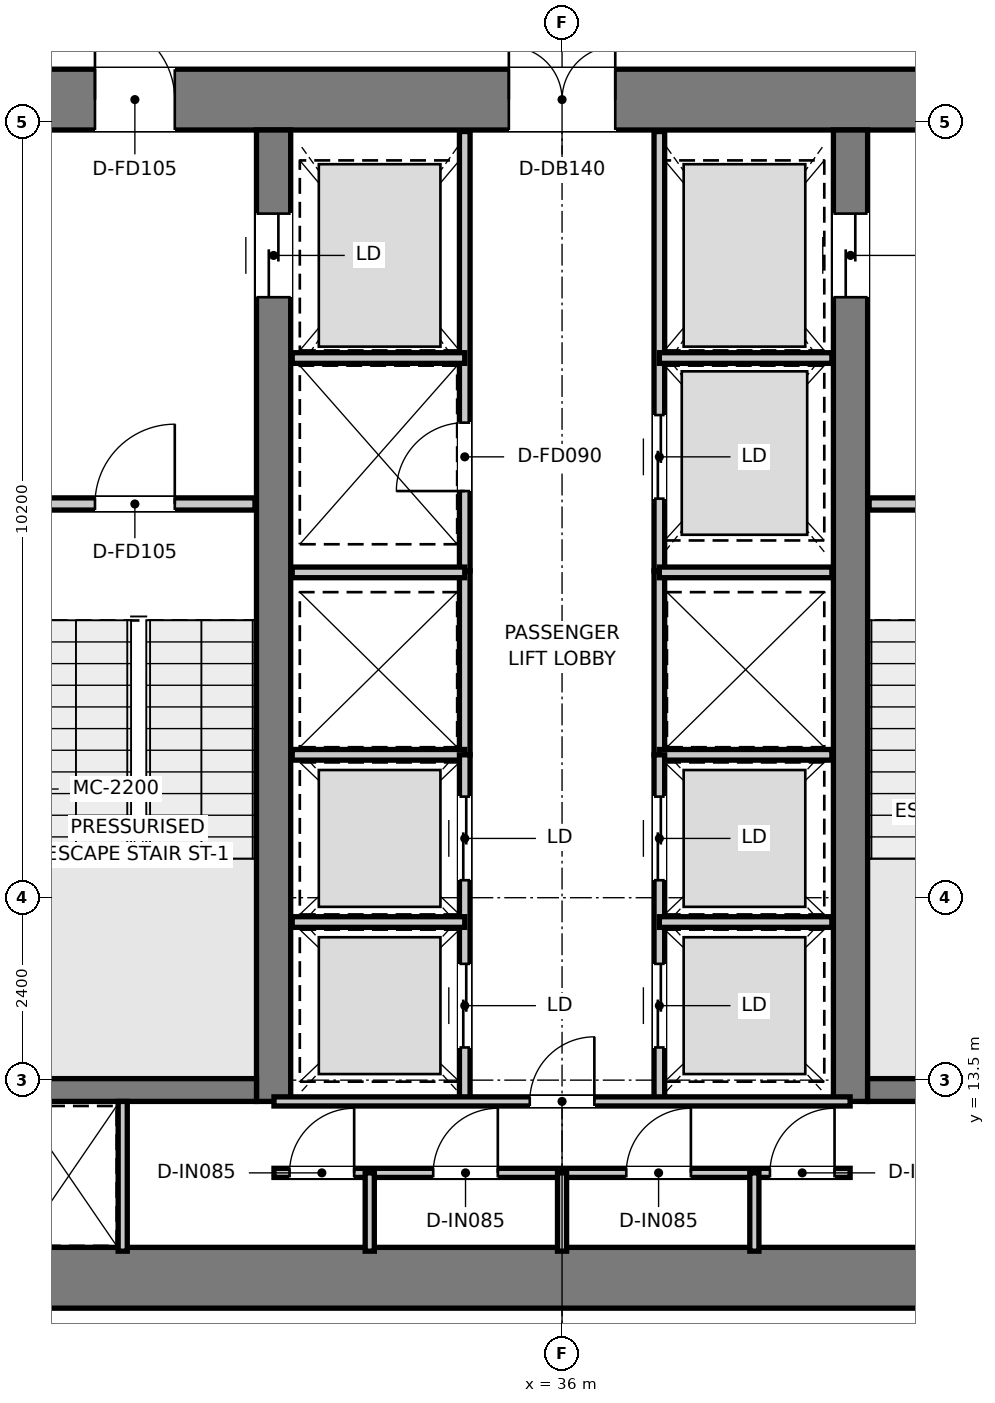
"""IFC4 building model, lengths in metres.
Left out: names, types, materials, properties, quantities, classifications, styles, units other than length and angle.
Written with IfcOpenShell. Run it as: python <this file> out.ifc"""

import sys

from ifc_helpers import new_model, si_unit, direction, frame, frame_2d, origin, place, context, subcontext, project, spatial, rectangle, extrude, element, fill, save


model = new_model("IFC4")
c1 = context("Model", 3, precision=1e-05, world=origin(), true_north=direction((0.0, 1.0)))
c2 = subcontext(c1, "Body", "Model", "MODEL_VIEW")
j1 = project(units=[si_unit("LENGTHUNIT", "METRE"), si_unit("PLANEANGLEUNIT", "RADIAN")], contexts=[c1])
p1 = place(None, origin())
s1 = spatial("IfcSite", under=j1, at=p1, CompositionType="ELEMENT")
p2 = place(p1, origin())
s2 = spatial("IfcBuilding", under=s1, at=p2, CompositionType="ELEMENT")
p3 = place(p2, frame((0.0, 0.0, 56.6)))
s3 = spatial("IfcBuildingStorey", under=s2, at=p3, CompositionType="ELEMENT", Elevation=56.6)
p4 = place(p3, frame((28.08, 10.9, 0.0), z_axis=(0.0, 0.0, 1.0), x_axis=(1.0, 0.0, 0.0)))
e1 = element("IfcWall", 1, at=p4, inside=s3, PredefinedType="SHEAR", context=c2, shape_type="SweptSolid", body=[
    extrude(rectangle(XDim=15.84, YDim=0.8, at=frame_2d((7.92, 0.0))), origin(), (0.0, 0.0, 1.0), 3.95),
])
p5 = place(p3, frame((28.08, 26.4, 0.0), z_axis=(0.0, 0.0, 1.0), x_axis=(1.0, 0.0, 0.0)))
e2 = element("IfcWall", 2, at=p5, inside=s3, PredefinedType="SHEAR", context=c2, shape_type="SweptSolid", body=[
    extrude(rectangle(XDim=15.84, YDim=0.8, at=frame_2d((7.92, 0.0))), origin(), (0.0, 0.0, 1.0), 3.95),
])
p6 = place(p5, frame((7.22, 0.0, 0.0)))
e3 = element("IfcOpeningElement", 3, at=p6, cuts=e2, PredefinedType="OPENING", context=c2, shape_type="SweptSolid", body=[
    extrude(rectangle(XDim=1.4, YDim=2.2, at=frame_2d((0.7, 1.1))), frame((0.0, 0.41, 0.0), z_axis=(0.0, -1.0, 0.0), x_axis=(1.0, 0.0, 0.0)), (0.0, 0.0, 1.0), 0.82),
])
p7 = place(p5, frame((1.775, 0.0, 0.0)))
e4 = element("IfcOpeningElement", 4, at=p7, cuts=e2, PredefinedType="OPENING", context=c2, shape_type="SweptSolid", body=[
    extrude(rectangle(XDim=1.05, YDim=2.1, at=frame_2d((0.525, 1.05))), frame((0.0, 0.41, 0.0), z_axis=(0.0, -1.0, 0.0), x_axis=(1.0, 0.0, 0.0)), (0.0, 0.0, 1.0), 0.82),
])
p8 = place(p5, frame((13.015, 0.0, 0.0)))
e5 = element("IfcOpeningElement", 5, at=p8, cuts=e2, PredefinedType="OPENING", context=c2, shape_type="SweptSolid", body=[
    extrude(rectangle(XDim=1.05, YDim=2.1, at=frame_2d((0.525, 1.05))), frame((0.0, 0.41, 0.0), z_axis=(0.0, -1.0, 0.0), x_axis=(1.0, 0.0, 0.0)), (0.0, 0.0, 1.0), 0.82),
])
p9 = place(p3, frame((32.205, 13.22, 0.0), z_axis=(0.0, 0.0, 1.0), x_axis=(0.0, 1.0, 0.0)))
e6 = element("IfcWall", 6, at=p9, inside=s3, PredefinedType="SHEAR", context=c2, shape_type="SweptSolid", body=[
    extrude(rectangle(XDim=12.78, YDim=0.45, at=frame_2d((6.39, 0.0))), origin(), (0.0, 0.0, 1.0), 3.95),
])
p10 = place(p9, frame((10.58, 0.0, 0.0)))
e7 = element("IfcOpeningElement", 7, at=p10, cuts=e6, PredefinedType="OPENING", context=c2, shape_type="SweptSolid", body=[
    extrude(rectangle(XDim=1.1, YDim=2.15, at=frame_2d((0.55, 1.075))), frame((0.0, 0.235, 0.0), z_axis=(0.0, -1.0, 0.0), x_axis=(1.0, 0.0, 0.0)), (0.0, 0.0, 1.0), 0.47),
])
p11 = place(p3, frame((39.795, 13.22, 0.0), z_axis=(0.0, 0.0, 1.0), x_axis=(0.0, 1.0, 0.0)))
e8 = element("IfcWall", 8, at=p11, inside=s3, PredefinedType="SHEAR", context=c2, shape_type="SweptSolid", body=[
    extrude(rectangle(XDim=12.78, YDim=0.45, at=frame_2d((6.39, 0.0))), origin(), (0.0, 0.0, 1.0), 3.95),
])
p12 = place(p11, frame((10.58, 0.0, 0.0)))
e9 = element("IfcOpeningElement", 9, at=p12, cuts=e8, PredefinedType="OPENING", context=c2, shape_type="SweptSolid", body=[
    extrude(rectangle(XDim=1.1, YDim=2.15, at=frame_2d((0.55, 1.075))), frame((0.0, 0.235, 0.0), z_axis=(0.0, -1.0, 0.0), x_axis=(1.0, 0.0, 0.0)), (0.0, 0.0, 1.0), 0.47),
])
for number, where, z_axis, x_axis in (
    (10, (28.88, 13.37, 0.0), (0.0, 0.0, 1.0), (1.0, 0.0, 0.0)),
    (11, (40.02, 13.37, 0.0), (0.0, 0.0, 1.0), (1.0, 0.0, 0.0)),
):
    element("IfcWall", number, at=place(p3, frame(where, z_axis=z_axis, x_axis=x_axis)), inside=s3, PredefinedType="SHEAR", context=c2, shape_type="SweptSolid", body=[
        extrude(rectangle(XDim=3.1, YDim=0.3, at=frame_2d((1.55, 0.0))), origin(), (0.0, 0.0, 1.0), 3.95),
    ])
p13 = place(p3, frame((28.8, 21.08, 0.0), z_axis=(0.0, 0.0, 1.0), x_axis=(1.0, 0.0, 0.0)))
e12 = element("IfcWall", 12, at=p13, inside=s3, PredefinedType="PARTITIONING", context=c2, shape_type="SweptSolid", body=[
    extrude(rectangle(XDim=3.16, YDim=0.16, at=frame_2d((1.58, 0.0))), origin(), (0.0, 0.0, 1.0), 3.67),
])
p14 = place(p13, frame((1.055, 0.0, 0.0)))
e13 = element("IfcOpeningElement", 13, at=p14, cuts=e12, PredefinedType="OPENING", context=c2, shape_type="SweptSolid", body=[
    extrude(rectangle(XDim=1.05, YDim=2.1, at=frame_2d((0.525, 1.05))), frame((0.0, 0.09, 0.0), z_axis=(0.0, -1.0, 0.0), x_axis=(1.0, 0.0, 0.0)), (0.0, 0.0, 1.0), 0.18),
])
p15 = place(p3, frame((40.04, 21.08, 0.0), z_axis=(0.0, 0.0, 1.0), x_axis=(1.0, 0.0, 0.0)))
e14 = element("IfcWall", 14, at=p15, inside=s3, PredefinedType="PARTITIONING", context=c2, shape_type="SweptSolid", body=[
    extrude(rectangle(XDim=3.16, YDim=0.16, at=frame_2d((1.58, 0.0))), origin(), (0.0, 0.0, 1.0), 3.67),
])
p16 = place(p15, frame((1.055, 0.0, 0.0)))
e15 = element("IfcOpeningElement", 15, at=p16, cuts=e14, PredefinedType="OPENING", context=c2, shape_type="SweptSolid", body=[
    extrude(rectangle(XDim=1.05, YDim=2.1, at=frame_2d((0.525, 1.05))), frame((0.0, 0.09, 0.0), z_axis=(0.0, -1.0, 0.0), x_axis=(1.0, 0.0, 0.0)), (0.0, 0.0, 1.0), 0.18),
])
p17 = place(p3, frame((34.72, 20.2, 0.0), z_axis=(0.0, 0.0, 1.0), x_axis=(0.0, 1.0, 0.0)))
e16 = element("IfcWall", 16, at=p17, inside=s3, PredefinedType="PARTITIONING", context=c2, shape_type="SweptSolid", body=[
    extrude(rectangle(XDim=5.78, YDim=0.14, at=frame_2d((2.89, 0.0))), origin(), (0.0, 0.0, 1.0), 2.47),
])
p18 = place(p17, frame((1.05, 0.0, 0.0)))
e17 = element("IfcOpeningElement", 17, at=p18, cuts=e16, PredefinedType="OPENING", context=c2, shape_type="SweptSolid", body=[
    extrude(rectangle(XDim=0.9, YDim=2.1, at=frame_2d((0.45, 1.05))), frame((0.0, 0.08, 0.0), z_axis=(0.0, -1.0, 0.0), x_axis=(1.0, 0.0, 0.0)), (0.0, 0.0, 1.0), 0.16),
])
p19 = place(p3, frame((37.28, 20.2, 0.0), z_axis=(0.0, 0.0, 1.0), x_axis=(0.0, 1.0, 0.0)))
e18 = element("IfcWall", 18, at=p19, inside=s3, PredefinedType="PARTITIONING", context=c2, shape_type="SweptSolid", body=[
    extrude(rectangle(XDim=5.78, YDim=0.14, at=frame_2d((2.89, 0.0))), origin(), (0.0, 0.0, 1.0), 2.47),
])
p20 = place(p19, frame((0.95, 0.0, 0.0)))
e19 = element("IfcOpeningElement", 19, at=p20, cuts=e18, PredefinedType="OPENING", context=c2, shape_type="SweptSolid", body=[
    extrude(rectangle(XDim=1.1, YDim=2.15, at=frame_2d((0.55, 1.075))), frame((0.0, 0.08, 0.0), z_axis=(0.0, -1.0, 0.0), x_axis=(1.0, 0.0, 0.0)), (0.0, 0.0, 1.0), 0.16),
])
for number, where, z_axis, x_axis in (
    (20, (32.45, 23.0, 0.0), (0.0, 0.0, 1.0), (1.0, 0.0, 0.0)),
    (21, (37.28, 23.0, 0.0), (0.0, 0.0, 1.0), (1.0, 0.0, 0.0)),
):
    element("IfcWall", number, at=place(p3, frame(where, z_axis=z_axis, x_axis=x_axis)), inside=s3, PredefinedType="PARTITIONING", context=c2, shape_type="SweptSolid", body=[
        extrude(rectangle(XDim=2.27, YDim=0.14, at=frame_2d((1.135, 0.0))), origin(), (0.0, 0.0, 1.0), 2.47),
    ])
for number, where, z_axis, x_axis in (
    (22, (34.72, 17.78, 0.0), (0.0, 0.0, 1.0), (0.0, 1.0, 0.0)),
    (23, (37.28, 17.78, 0.0), (0.0, 0.0, 1.0), (0.0, 1.0, 0.0)),
):
    element("IfcWall", number, at=place(p3, frame(where, z_axis=z_axis, x_axis=x_axis)), inside=s3, PredefinedType="PARTITIONING", context=c2, shape_type="SweptSolid", body=[
        extrude(rectangle(XDim=2.42, YDim=0.14, at=frame_2d((1.21, 0.0))), origin(), (0.0, 0.0, 1.0), 3.67),
    ])
for number, where, z_axis, x_axis in (
    (24, (32.45, 17.78, 0.0), (0.0, 0.0, 1.0), (1.0, 0.0, 0.0)),
    (25, (32.45, 20.18, 0.0), (0.0, 0.0, 1.0), (1.0, 0.0, 0.0)),
    (26, (37.28, 17.78, 0.0), (0.0, 0.0, 1.0), (1.0, 0.0, 0.0)),
    (27, (37.28, 20.18, 0.0), (0.0, 0.0, 1.0), (1.0, 0.0, 0.0)),
):
    element("IfcWall", number, at=place(p3, frame(where, z_axis=z_axis, x_axis=x_axis)), inside=s3, PredefinedType="PARTITIONING", context=c2, shape_type="SweptSolid", body=[
        extrude(rectangle(XDim=2.27, YDim=0.14, at=frame_2d((1.135, 0.0))), origin(), (0.0, 0.0, 1.0), 3.67),
    ])
p21 = place(p3, frame((34.72, 13.22, 0.0), z_axis=(0.0, 0.0, 1.0), x_axis=(0.0, 1.0, 0.0)))
e28 = element("IfcWall", 28, at=p21, inside=s3, PredefinedType="PARTITIONING", context=c2, shape_type="SweptSolid", body=[
    extrude(rectangle(XDim=4.56, YDim=0.14, at=frame_2d((2.28, 0.0))), origin(), (0.0, 0.0, 1.0), 3.67),
])
p22 = place(p21, frame((0.71, 0.0, 0.0)))
e29 = element("IfcOpeningElement", 29, at=p22, cuts=e28, PredefinedType="OPENING", context=c2, shape_type="SweptSolid", body=[
    extrude(rectangle(XDim=1.1, YDim=2.15, at=frame_2d((0.55, 1.075))), frame((0.0, 0.08, 0.0), z_axis=(0.0, -1.0, 0.0), x_axis=(1.0, 0.0, 0.0)), (0.0, 0.0, 1.0), 0.16),
])
p23 = place(p21, frame((2.91, 0.0, 0.0)))
e30 = element("IfcOpeningElement", 30, at=p23, cuts=e28, PredefinedType="OPENING", context=c2, shape_type="SweptSolid", body=[
    extrude(rectangle(XDim=1.1, YDim=2.15, at=frame_2d((0.55, 1.075))), frame((0.0, 0.08, 0.0), z_axis=(0.0, -1.0, 0.0), x_axis=(1.0, 0.0, 0.0)), (0.0, 0.0, 1.0), 0.16),
])
p24 = place(p3, frame((32.45, 15.58, 0.0), z_axis=(0.0, 0.0, 1.0), x_axis=(1.0, 0.0, 0.0)))
e31 = element("IfcWall", 31, at=p24, inside=s3, PredefinedType="PARTITIONING", context=c2, shape_type="SweptSolid", body=[
    extrude(rectangle(XDim=2.27, YDim=0.14, at=frame_2d((1.135, 0.0))), origin(), (0.0, 0.0, 1.0), 3.67),
])
p25 = place(p3, frame((37.28, 13.22, 0.0), z_axis=(0.0, 0.0, 1.0), x_axis=(0.0, 1.0, 0.0)))
e32 = element("IfcWall", 32, at=p25, inside=s3, PredefinedType="PARTITIONING", context=c2, shape_type="SweptSolid", body=[
    extrude(rectangle(XDim=4.56, YDim=0.14, at=frame_2d((2.28, 0.0))), origin(), (0.0, 0.0, 1.0), 3.67),
])
p26 = place(p25, frame((0.71, 0.0, 0.0)))
e33 = element("IfcOpeningElement", 33, at=p26, cuts=e32, PredefinedType="OPENING", context=c2, shape_type="SweptSolid", body=[
    extrude(rectangle(XDim=1.1, YDim=2.15, at=frame_2d((0.55, 1.075))), frame((0.0, 0.08, 0.0), z_axis=(0.0, -1.0, 0.0), x_axis=(1.0, 0.0, 0.0)), (0.0, 0.0, 1.0), 0.16),
])
p27 = place(p25, frame((2.91, 0.0, 0.0)))
e34 = element("IfcOpeningElement", 34, at=p27, cuts=e32, PredefinedType="OPENING", context=c2, shape_type="SweptSolid", body=[
    extrude(rectangle(XDim=1.1, YDim=2.15, at=frame_2d((0.55, 1.075))), frame((0.0, 0.08, 0.0), z_axis=(0.0, -1.0, 0.0), x_axis=(1.0, 0.0, 0.0)), (0.0, 0.0, 1.0), 0.16),
])
p28 = place(p3, frame((37.28, 15.58, 0.0), z_axis=(0.0, 0.0, 1.0), x_axis=(1.0, 0.0, 0.0)))
e35 = element("IfcWall", 35, at=p28, inside=s3, PredefinedType="PARTITIONING", context=c2, shape_type="SweptSolid", body=[
    extrude(rectangle(XDim=2.27, YDim=0.14, at=frame_2d((1.135, 0.0))), origin(), (0.0, 0.0, 1.0), 3.67),
])
p29 = place(p3, frame((30.22, 11.25, 0.0), z_axis=(0.0, 0.0, 1.0), x_axis=(0.0, 1.0, 0.0)))
e36 = element("IfcWall", 36, at=p29, inside=s3, PredefinedType="PARTITIONING", context=c2, shape_type="SweptSolid", body=[
    extrude(rectangle(XDim=1.97, YDim=0.12, at=frame_2d((0.985, 0.0))), origin(), (0.0, 0.0, 1.0), 3.67),
])
p30 = place(p3, frame((32.21, 13.22, 0.0), z_axis=(0.0, 0.0, 1.0), x_axis=(1.0, 0.0, 0.0)))
e37 = element("IfcWall", 37, at=p30, inside=s3, PredefinedType="PARTITIONING", context=c2, shape_type="SweptSolid", body=[
    extrude(rectangle(XDim=7.58, YDim=0.12, at=frame_2d((3.79, 0.0))), origin(), (0.0, 0.0, 1.0), 3.67),
])
p31 = place(p30, frame((3.365, 0.0, 0.0)))
e38 = element("IfcOpeningElement", 38, at=p31, cuts=e37, PredefinedType="OPENING", context=c2, shape_type="SweptSolid", body=[
    extrude(rectangle(XDim=0.85, YDim=2.1, at=frame_2d((0.425, 1.05))), frame((0.0, 0.07, 0.0), z_axis=(0.0, -1.0, 0.0), x_axis=(1.0, 0.0, 0.0)), (0.0, 0.0, 1.0), 0.14),
])
p32 = place(p3, frame((32.21, 12.28, 0.0), z_axis=(0.0, 0.0, 1.0), x_axis=(1.0, 0.0, 0.0)))
e39 = element("IfcWall", 39, at=p32, inside=s3, PredefinedType="PARTITIONING", context=c2, shape_type="SweptSolid", body=[
    extrude(rectangle(XDim=7.58, YDim=0.12, at=frame_2d((3.79, 0.0))), origin(), (0.0, 0.0, 1.0), 3.67),
])
p33 = place(p32, frame((0.205, 0.0, 0.0)))
e40 = element("IfcOpeningElement", 40, at=p33, cuts=e39, PredefinedType="OPENING", context=c2, shape_type="SweptSolid", body=[
    extrude(rectangle(XDim=0.85, YDim=2.1, at=frame_2d((0.425, 1.05))), frame((0.0, 0.07, 0.0), z_axis=(0.0, -1.0, 0.0), x_axis=(1.0, 0.0, 0.0)), (0.0, 0.0, 1.0), 0.14),
])
p34 = place(p32, frame((2.095, 0.0, 0.0)))
e41 = element("IfcOpeningElement", 41, at=p34, cuts=e39, PredefinedType="OPENING", context=c2, shape_type="SweptSolid", body=[
    extrude(rectangle(XDim=0.85, YDim=2.1, at=frame_2d((0.425, 1.05))), frame((0.0, 0.07, 0.0), z_axis=(0.0, -1.0, 0.0), x_axis=(1.0, 0.0, 0.0)), (0.0, 0.0, 1.0), 0.14),
])
p35 = place(p32, frame((4.635, 0.0, 0.0)))
e42 = element("IfcOpeningElement", 42, at=p35, cuts=e39, PredefinedType="OPENING", context=c2, shape_type="SweptSolid", body=[
    extrude(rectangle(XDim=0.85, YDim=2.1, at=frame_2d((0.425, 1.05))), frame((0.0, 0.07, 0.0), z_axis=(0.0, -1.0, 0.0), x_axis=(1.0, 0.0, 0.0)), (0.0, 0.0, 1.0), 0.14),
])
p36 = place(p32, frame((6.525, 0.0, 0.0)))
e43 = element("IfcOpeningElement", 43, at=p36, cuts=e39, PredefinedType="OPENING", context=c2, shape_type="SweptSolid", body=[
    extrude(rectangle(XDim=0.85, YDim=2.1, at=frame_2d((0.425, 1.05))), frame((0.0, 0.07, 0.0), z_axis=(0.0, -1.0, 0.0), x_axis=(1.0, 0.0, 0.0)), (0.0, 0.0, 1.0), 0.14),
])
for number, where, z_axis, x_axis in (
    (44, (33.47, 11.25, 0.0), (0.0, 0.0, 1.0), (0.0, 1.0, 0.0)),
    (45, (36.0, 11.25, 0.0), (0.0, 0.0, 1.0), (0.0, 1.0, 0.0)),
    (46, (38.53, 11.25, 0.0), (0.0, 0.0, 1.0), (0.0, 1.0, 0.0)),
):
    element("IfcWall", number, at=place(p3, frame(where, z_axis=z_axis, x_axis=x_axis)), inside=s3, PredefinedType="PARTITIONING", context=c2, shape_type="SweptSolid", body=[
        extrude(rectangle(XDim=1.03, YDim=0.12, at=frame_2d((0.515, 0.0))), origin(), (0.0, 0.0, 1.0), 3.67),
    ])
p37 = place(p14, origin())
e47 = element("IfcDoor", 47, at=p37, inside=s3, OperationType="SINGLE_SWING_RIGHT", PredefinedType="DOOR", context=c2, shape_type="SweptSolid", body=[
    extrude(rectangle(XDim=1.05, YDim=2.1, at=frame_2d((0.525, 1.05))), frame((0.0, 0.025, 0.0), z_axis=(0.0, -1.0, 0.0), x_axis=(1.0, 0.0, 0.0)), (0.0, 0.0, 1.0), 0.05),
])
fill(e13, e47)
p38 = place(p6, origin())
e48 = element("IfcDoor", 48, at=p38, inside=s3, OperationType="DOUBLE_DOOR_SINGLE_SWING", PredefinedType="DOOR", context=c2, shape_type="SweptSolid", body=[
    extrude(rectangle(XDim=1.4, YDim=2.2, at=frame_2d((0.7, 1.1))), frame((0.0, 0.025, 0.0), z_axis=(0.0, -1.0, 0.0), x_axis=(1.0, 0.0, 0.0)), (0.0, 0.0, 1.0), 0.05),
])
fill(e3, e48)
p39 = place(p7, origin())
e49 = element("IfcDoor", 49, at=p39, inside=s3, OperationType="SINGLE_SWING_LEFT", PredefinedType="DOOR", context=c2, shape_type="SweptSolid", body=[
    extrude(rectangle(XDim=1.05, YDim=2.1, at=frame_2d((0.525, 1.05))), frame((0.0, 0.025, 0.0), z_axis=(0.0, -1.0, 0.0), x_axis=(1.0, 0.0, 0.0)), (0.0, 0.0, 1.0), 0.05),
])
fill(e4, e49)
p40 = place(p10, origin())
e50 = element("IfcDoor", 50, at=p40, inside=s3, OperationType="DOUBLE_DOOR_SLIDING", PredefinedType="DOOR", context=c2, shape_type="SweptSolid", body=[
    extrude(rectangle(XDim=1.1, YDim=2.15, at=frame_2d((0.55, 1.075))), frame((0.0, 0.025, 0.0), z_axis=(0.0, -1.0, 0.0), x_axis=(1.0, 0.0, 0.0)), (0.0, 0.0, 1.0), 0.05),
])
fill(e7, e50)
p41 = place(p12, origin())
e51 = element("IfcDoor", 51, at=p41, inside=s3, OperationType="DOUBLE_DOOR_SLIDING", PredefinedType="DOOR", context=c2, shape_type="SweptSolid", body=[
    extrude(rectangle(XDim=1.1, YDim=2.15, at=frame_2d((0.55, 1.075))), frame((0.0, 0.025, 0.0), z_axis=(0.0, -1.0, 0.0), x_axis=(1.0, 0.0, 0.0)), (0.0, 0.0, 1.0), 0.05),
])
fill(e9, e51)
p42 = place(p18, origin())
e52 = element("IfcDoor", 52, at=p42, inside=s3, OperationType="SINGLE_SWING_LEFT", PredefinedType="DOOR", context=c2, shape_type="SweptSolid", body=[
    extrude(rectangle(XDim=0.9, YDim=2.1, at=frame_2d((0.45, 1.05))), frame((0.0, 0.025, 0.0), z_axis=(0.0, -1.0, 0.0), x_axis=(1.0, 0.0, 0.0)), (0.0, 0.0, 1.0), 0.05),
])
fill(e17, e52)
p43 = place(p20, origin())
e53 = element("IfcDoor", 53, at=p43, inside=s3, OperationType="DOUBLE_DOOR_SLIDING", PredefinedType="DOOR", context=c2, shape_type="SweptSolid", body=[
    extrude(rectangle(XDim=1.1, YDim=2.15, at=frame_2d((0.55, 1.075))), frame((0.0, 0.025, 0.0), z_axis=(0.0, -1.0, 0.0), x_axis=(1.0, 0.0, 0.0)), (0.0, 0.0, 1.0), 0.05),
])
fill(e19, e53)
p44 = place(p22, origin())
e54 = element("IfcDoor", 54, at=p44, inside=s3, OperationType="DOUBLE_DOOR_SLIDING", PredefinedType="DOOR", context=c2, shape_type="SweptSolid", body=[
    extrude(rectangle(XDim=1.1, YDim=2.15, at=frame_2d((0.55, 1.075))), frame((0.0, 0.025, 0.0), z_axis=(0.0, -1.0, 0.0), x_axis=(1.0, 0.0, 0.0)), (0.0, 0.0, 1.0), 0.05),
])
fill(e29, e54)
p45 = place(p23, origin())
e55 = element("IfcDoor", 55, at=p45, inside=s3, OperationType="DOUBLE_DOOR_SLIDING", PredefinedType="DOOR", context=c2, shape_type="SweptSolid", body=[
    extrude(rectangle(XDim=1.1, YDim=2.15, at=frame_2d((0.55, 1.075))), frame((0.0, 0.025, 0.0), z_axis=(0.0, -1.0, 0.0), x_axis=(1.0, 0.0, 0.0)), (0.0, 0.0, 1.0), 0.05),
])
fill(e30, e55)
p46 = place(p26, origin())
e56 = element("IfcDoor", 56, at=p46, inside=s3, OperationType="DOUBLE_DOOR_SLIDING", PredefinedType="DOOR", context=c2, shape_type="SweptSolid", body=[
    extrude(rectangle(XDim=1.1, YDim=2.15, at=frame_2d((0.55, 1.075))), frame((0.0, 0.025, 0.0), z_axis=(0.0, -1.0, 0.0), x_axis=(1.0, 0.0, 0.0)), (0.0, 0.0, 1.0), 0.05),
])
fill(e33, e56)
p47 = place(p27, origin())
e57 = element("IfcDoor", 57, at=p47, inside=s3, OperationType="DOUBLE_DOOR_SLIDING", PredefinedType="DOOR", context=c2, shape_type="SweptSolid", body=[
    extrude(rectangle(XDim=1.1, YDim=2.15, at=frame_2d((0.55, 1.075))), frame((0.0, 0.025, 0.0), z_axis=(0.0, -1.0, 0.0), x_axis=(1.0, 0.0, 0.0)), (0.0, 0.0, 1.0), 0.05),
])
fill(e34, e57)
p48 = place(p31, origin())
e58 = element("IfcDoor", 58, at=p48, inside=s3, OperationType="SINGLE_SWING_RIGHT", PredefinedType="DOOR", context=c2, shape_type="SweptSolid", body=[
    extrude(rectangle(XDim=0.85, YDim=2.1, at=frame_2d((0.425, 1.05))), frame((0.0, 0.025, 0.0), z_axis=(0.0, -1.0, 0.0), x_axis=(1.0, 0.0, 0.0)), (0.0, 0.0, 1.0), 0.05),
])
fill(e38, e58)
p49 = place(p33, origin())
e59 = element("IfcDoor", 59, at=p49, inside=s3, OperationType="SINGLE_SWING_RIGHT", PredefinedType="DOOR", context=c2, shape_type="SweptSolid", body=[
    extrude(rectangle(XDim=0.85, YDim=2.1, at=frame_2d((0.425, 1.05))), frame((0.0, 0.025, 0.0), z_axis=(0.0, -1.0, 0.0), x_axis=(1.0, 0.0, 0.0)), (0.0, 0.0, 1.0), 0.05),
])
fill(e40, e59)
p50 = place(p34, origin())
e60 = element("IfcDoor", 60, at=p50, inside=s3, OperationType="SINGLE_SWING_RIGHT", PredefinedType="DOOR", context=c2, shape_type="SweptSolid", body=[
    extrude(rectangle(XDim=0.85, YDim=2.1, at=frame_2d((0.425, 1.05))), frame((0.0, 0.025, 0.0), z_axis=(0.0, -1.0, 0.0), x_axis=(1.0, 0.0, 0.0)), (0.0, 0.0, 1.0), 0.05),
])
fill(e41, e60)
p51 = place(p35, origin())
e61 = element("IfcDoor", 61, at=p51, inside=s3, OperationType="SINGLE_SWING_RIGHT", PredefinedType="DOOR", context=c2, shape_type="SweptSolid", body=[
    extrude(rectangle(XDim=0.85, YDim=2.1, at=frame_2d((0.425, 1.05))), frame((0.0, 0.025, 0.0), z_axis=(0.0, -1.0, 0.0), x_axis=(1.0, 0.0, 0.0)), (0.0, 0.0, 1.0), 0.05),
])
fill(e42, e61)
p52 = place(p36, origin())
e62 = element("IfcDoor", 62, at=p52, inside=s3, OperationType="SINGLE_SWING_RIGHT", PredefinedType="DOOR", context=c2, shape_type="SweptSolid", body=[
    extrude(rectangle(XDim=0.85, YDim=2.1, at=frame_2d((0.425, 1.05))), frame((0.0, 0.025, 0.0), z_axis=(0.0, -1.0, 0.0), x_axis=(1.0, 0.0, 0.0)), (0.0, 0.0, 1.0), 0.05),
])
fill(e43, e62)
save(model, sys.argv[1])
